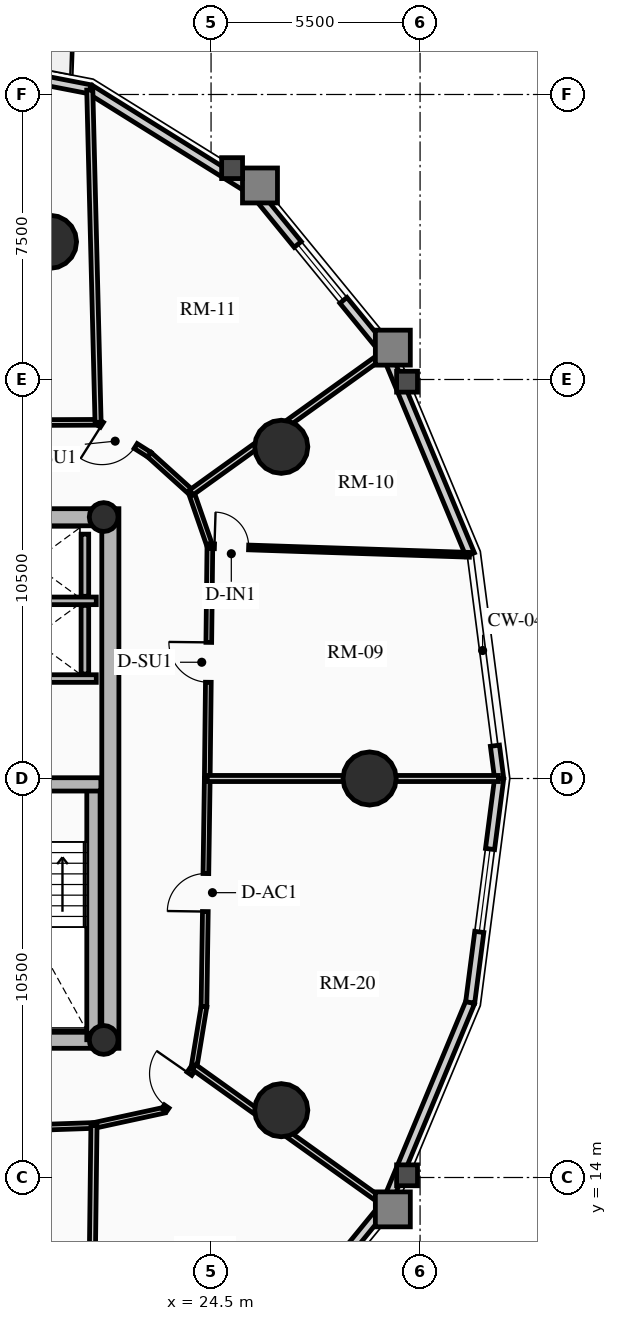
"""IFC4 building model, lengths in metres.
Left out: names, types, materials, properties, quantities, classifications, styles, units other than length and angle.
Written with IfcOpenShell. Run it as: python <this file> out.ifc"""

import sys

from ifc_helpers import new_model, si_unit, direction, frame, frame_2d, origin, origin_2d, place, context, subcontext, project, spatial, rectangle, circle, hollow_circle, extrude, source, transform, mapped, element, fill, save


model = new_model("IFC4")
c1 = context("Model", 3, precision=1e-05, world=origin(), true_north=direction((0.0, 1.0)))
c2 = subcontext(c1, "Body", "Model", "MODEL_VIEW")
j1 = project(units=[si_unit("LENGTHUNIT", "METRE"), si_unit("PLANEANGLEUNIT", "RADIAN")], contexts=[c1])
p1 = place(None, origin())
s1 = spatial("IfcSite", under=j1, at=p1, CompositionType="ELEMENT")
p2 = place(p1, origin())
s2 = spatial("IfcBuilding", under=s1, at=p2, CompositionType="ELEMENT")
p3 = place(p2, frame((0.0, 0.0, 84.7)))
s3 = spatial("IfcBuildingStorey", under=s2, at=p3, CompositionType="ELEMENT", Elevation=84.7)
p4 = place(p3, frame((21.85, 17.4, 0.0), z_axis=(0.0, 0.0, 1.0), x_axis=(0.0, 1.0, 0.0)))
e1 = element("IfcWall", 1, at=p4, inside=s3, PredefinedType="SHEAR", context=c2, shape_type="SweptSolid", body=[
    extrude(rectangle(XDim=14.2, YDim=0.45, at=frame_2d((7.1, 0.0))), origin(), (0.0, 0.0, 1.0), 2.91),
])
p5 = place(p3, frame((11.15, 17.625, 0.0), z_axis=(0.0, 0.0, 1.0), x_axis=(1.0, 0.0, 0.0)))
e2 = element("IfcWall", 2, at=p5, inside=s3, PredefinedType="SHEAR", context=c2, shape_type="SweptSolid", body=[
    extrude(rectangle(XDim=10.7, YDim=0.45, at=frame_2d((5.35, 0.0))), origin(), (0.0, 0.0, 1.0), 2.91),
])
m1 = source(origin(), c2, "Body", "SweptSolid", [
    extrude(rectangle(XDim=1.5, YDim=2.02, at=frame_2d((0.75, 1.01))), frame((0.0, 0.235, 0.0), z_axis=(0.0, -1.0, 0.0), x_axis=(1.0, 0.0, 0.0)), (0.0, 0.0, 1.0), 0.47),
])
p6 = place(p5, frame((5.45, 0.0, 0.0)))
e3 = element("IfcOpeningElement", 3, at=p6, cuts=e2, PredefinedType="OPENING", context=c2, shape_type="MappedRepresentation", body=[
    mapped(m1, transform((0.0, 0.0, 0.0), x_axis=(1.0, 0.0, 0.0), y_axis=(0.0, 1.0, 0.0), z_axis=(0.0, 0.0, 1.0), scale=1.0)),
])
p7 = place(p3, frame((11.15, 31.375, 0.0), z_axis=(0.0, 0.0, 1.0), x_axis=(1.0, 0.0, 0.0)))
e4 = element("IfcWall", 4, at=p7, inside=s3, PredefinedType="SHEAR", context=c2, shape_type="SweptSolid", body=[
    extrude(rectangle(XDim=10.7, YDim=0.45, at=frame_2d((5.35, 0.0))), origin(), (0.0, 0.0, 1.0), 2.91),
])
p8 = place(p7, frame((4.6, 0.0, 0.0)))
e5 = element("IfcOpeningElement", 5, at=p8, cuts=e4, PredefinedType="OPENING", context=c2, shape_type="MappedRepresentation", body=[
    mapped(m1, transform((0.0, 0.0, 0.0), x_axis=(1.0, 0.0, 0.0), y_axis=(0.0, 1.0, 0.0), z_axis=(0.0, 0.0, 1.0), scale=1.0)),
])
p9 = place(p3, frame((21.405, 17.625, 0.0), z_axis=(0.0, 0.0, 1.0), x_axis=(0.0, 1.0, 0.0)))
e6 = element("IfcWall", 6, at=p9, inside=s3, PredefinedType="SHEAR", context=c2, shape_type="SweptSolid", body=[
    extrude(rectangle(XDim=6.72, YDim=0.35, at=frame_2d((3.36, 0.0))), origin(), (0.0, 0.0, 1.0), 2.91),
])
p10 = place(p3, frame((18.315, 24.345, 0.0), z_axis=(0.0, 0.0, 1.0), x_axis=(1.0, 0.0, 0.0)))
e7 = element("IfcWall", 7, at=p10, inside=s3, PredefinedType="SHEAR", context=c2, shape_type="SweptSolid", body=[
    extrude(rectangle(XDim=3.285, YDim=0.35, at=frame_2d((1.643, 0.0))), origin(), (0.0, 0.0, 1.0), 2.91),
])
for number, where, z_axis, x_axis in (
    (8, (21.675, 17.62, 0.0), (0.0, 0.0, 1.0), (1.0, 0.0, 0.0)),
    (9, (21.675, 31.38, 0.0), (0.0, 0.0, 1.0), (1.0, 0.0, 0.0)),
):
    element("IfcColumn", number, at=place(p3, frame(where, z_axis=z_axis, x_axis=x_axis)), inside=s3, PredefinedType="COLUMN", context=c2, shape_type="SweptSolid", body=[
        extrude(hollow_circle(Radius=0.38, WallThickness=0.032, at=origin_2d()), origin(), (0.0, 0.0, 1.0), 2.91),
    ])
for number, where, z_axis, x_axis in (
    (10, (28.672, 24.5, 0.0), (0.0, 0.0, 1.0), (1.0, 0.0, 0.0)),
    (11, (26.347, 33.229, 0.0), (0.0, 0.0, 1.0), (1.0, 0.0, 0.0)),
    (12, (20.261, 38.623, 0.0), (0.0, 0.0, 1.0), (1.0, 0.0, 0.0)),
    (13, (26.347, 15.771, 0.0), (0.0, 0.0, 1.0), (1.0, 0.0, 0.0)),
):
    element("IfcColumn", number, at=place(p3, frame(where, z_axis=z_axis, x_axis=x_axis)), inside=s3, PredefinedType="USERDEFINED", context=c2, shape_type="SweptSolid", body=[
        extrude(circle(Radius=0.7, at=origin_2d()), origin(), (0.0, 0.0, 1.0), 2.91),
    ])
p11 = place(p3, frame((31.969, 25.363, 0.0), z_axis=(0.0, 0.0, 1.0), x_axis=(0.128523364007, -0.991706481225, 0.0)))
e14 = element("IfcWall", 14, at=p11, inside=s3, PredefinedType="SOLIDWALL", context=c2, shape_type="SweptSolid", body=[
    extrude(rectangle(XDim=0.87, YDim=0.24, at=frame_2d((0.435, 0.0))), origin(), (0.0, 0.0, 1.0), 2.655),
])
p12 = place(p3, frame((29.105, 35.709, 0.0), z_axis=(0.0, 0.0, 1.0), x_axis=(0.384344417632, -0.923189779317, 0.0)))
e15 = element("IfcWall", 15, at=p12, inside=s3, PredefinedType="SOLIDWALL", context=c2, shape_type="SweptSolid", body=[
    extrude(rectangle(XDim=5.758, YDim=0.24, at=frame_2d((2.879, 0.0))), origin(), (0.0, 0.0, 1.0), 2.179),
])
p13 = place(p3, frame((25.658, 39.928, 0.0), z_axis=(0.0, 0.0, 1.0), x_axis=(0.632700781152, -0.77439635945, 0.0)))
e16 = element("IfcWall", 16, at=p13, inside=s3, PredefinedType="SOLIDWALL", context=c2, shape_type="SweptSolid", body=[
    extrude(rectangle(XDim=5.448, YDim=0.24, at=frame_2d((2.724, 0.0))), origin(), (0.0, 0.0, 1.0), 2.179),
])
m2 = source(origin(), c2, "Body", "SweptSolid", [
    extrude(rectangle(XDim=1.9, YDim=1.35, at=frame_2d((0.95, 0.675))), frame((0.0, 0.13, 0.0), z_axis=(0.0, -1.0, 0.0), x_axis=(1.0, 0.0, 0.0)), (0.0, 0.0, 1.0), 0.26),
])
p14 = place(p13, frame((1.774, 0.0, 0.65)))
e17 = element("IfcOpeningElement", 17, at=p14, cuts=e16, PredefinedType="OPENING", context=c2, shape_type="MappedRepresentation", body=[
    mapped(m2, transform((0.0, 0.0, 0.0), x_axis=(1.0, 0.0, 0.0), y_axis=(0.0, 1.0, 0.0), z_axis=(0.0, 0.0, 1.0), scale=1.0)),
])
p15 = place(p3, frame((21.315, 42.637, 0.0), z_axis=(0.0, 0.0, 1.0), x_axis=(0.848520380187, -0.529162701263, 0.0)))
e18 = element("IfcWall", 18, at=p15, inside=s3, PredefinedType="SOLIDWALL", context=c2, shape_type="SweptSolid", body=[
    extrude(rectangle(XDim=5.119, YDim=0.24, at=frame_2d((2.56, 0.0))), origin(), (0.0, 0.0, 1.0), 2.179),
])
p16 = place(p3, frame((16.5, 43.57, 0.0), z_axis=(0.0, 0.0, 1.0), x_axis=(0.981723785992, -0.190311344954, 0.0)))
e19 = element("IfcWall", 19, at=p16, inside=s3, PredefinedType="SOLIDWALL", context=c2, shape_type="SweptSolid", body=[
    extrude(rectangle(XDim=4.904, YDim=0.24, at=frame_2d((2.452, 0.0))), origin(), (0.0, 0.0, 1.0), 2.179),
])
m3 = source(origin(), c2, "Body", "SweptSolid", [
    extrude(rectangle(XDim=1.15, YDim=2.005, at=frame_2d((0.575, 1.002))), frame((0.0, 0.13, 0.0), z_axis=(0.0, -1.0, 0.0), x_axis=(1.0, 0.0, 0.0)), (0.0, 0.0, 1.0), 0.26),
])
p17 = place(p16, frame((1.877, 0.0, 0.0)))
e20 = element("IfcOpeningElement", 20, at=p17, cuts=e19, PredefinedType="OPENING", context=c2, shape_type="MappedRepresentation", body=[
    mapped(m3, transform((0.0, 0.0, 0.0), x_axis=(1.0, 0.0, 0.0), y_axis=(0.0, 1.0, 0.0), z_axis=(0.0, 0.0, 1.0), scale=1.0)),
])
p18 = place(p3, frame((29.105, 13.291, 0.0), z_axis=(0.0, 0.0, 1.0), x_axis=(-0.632700781152, -0.77439635945, 0.0)))
e21 = element("IfcWall", 21, at=p18, inside=s3, PredefinedType="SOLIDWALL", context=c2, shape_type="SweptSolid", body=[
    extrude(rectangle(XDim=5.448, YDim=0.24, at=frame_2d((2.724, 0.0))), origin(), (0.0, 0.0, 1.0), 2.179),
])
p19 = place(p18, frame((1.774, 0.0, 0.65)))
e22 = element("IfcOpeningElement", 22, at=p19, cuts=e21, PredefinedType="OPENING", context=c2, shape_type="MappedRepresentation", body=[
    mapped(m2, transform((0.0, 0.0, 0.0), x_axis=(1.0, 0.0, 0.0), y_axis=(0.0, 1.0, 0.0), z_axis=(0.0, 0.0, 1.0), scale=1.0)),
])
p20 = place(p3, frame((31.318, 18.607, 0.0), z_axis=(0.0, 0.0, 1.0), x_axis=(-0.384344417632, -0.923189779317, 0.0)))
e23 = element("IfcWall", 23, at=p20, inside=s3, PredefinedType="SOLIDWALL", context=c2, shape_type="SweptSolid", body=[
    extrude(rectangle(XDim=5.758, YDim=0.24, at=frame_2d((2.879, 0.0))), origin(), (0.0, 0.0, 1.0), 2.179),
])
p21 = place(p3, frame((32.081, 24.5, 0.0), z_axis=(0.0, 0.0, 1.0), x_axis=(-0.128351991996, -0.991728675672, 0.0)))
e24 = element("IfcWall", 24, at=p21, inside=s3, PredefinedType="SOLIDWALL", context=c2, shape_type="SweptSolid", body=[
    extrude(rectangle(XDim=5.942, YDim=0.24, at=frame_2d((2.971, 0.0))), origin(), (0.0, 0.0, 1.0), 2.179),
])
m4 = source(origin(), c2, "Body", "SweptSolid", [
    extrude(rectangle(XDim=2.2, YDim=1.35, at=frame_2d((1.1, 0.675))), frame((0.0, 0.13, 0.0), z_axis=(0.0, -1.0, 0.0), x_axis=(1.0, 0.0, 0.0)), (0.0, 0.0, 1.0), 0.26),
])
p22 = place(p21, frame((1.871, 0.0, 0.65)))
e25 = element("IfcOpeningElement", 25, at=p22, cuts=e24, PredefinedType="OPENING", context=c2, shape_type="MappedRepresentation", body=[
    mapped(m4, transform((0.0, 0.0, 0.0), x_axis=(1.0, 0.0, 0.0), y_axis=(0.0, 1.0, 0.0), z_axis=(0.0, 0.0, 1.0), scale=1.0)),
])
for number, where, z_axis, x_axis in (
    (26, (18.51, 27.13, 0.0), (0.0, 0.0, 1.0), (1.0, 0.0, 0.0)),
    (27, (18.51, 29.175, 0.0), (0.0, 0.0, 1.0), (1.0, 0.0, 0.0)),
):
    element("IfcWall", number, at=place(p3, frame(where, z_axis=z_axis, x_axis=x_axis)), inside=s3, PredefinedType="SHEAR", context=c2, shape_type="SweptSolid", body=[
        extrude(rectangle(XDim=2.97, YDim=0.2, at=frame_2d((1.485, 0.0))), origin(), (0.0, 0.0, 1.0), 2.91),
    ])
p23 = place(p3, frame((21.18, 27.25, 0.0), z_axis=(0.0, 0.0, 1.0), x_axis=(0.0, 1.0, 0.0)))
e28 = element("IfcWall", 28, at=p23, inside=s3, PredefinedType="SHEAR", context=c2, shape_type="SweptSolid", body=[
    extrude(rectangle(XDim=1.805, YDim=0.2, at=frame_2d((0.902, 0.0))), origin(), (0.0, 0.0, 1.0), 2.91),
])
p24 = place(p3, frame((21.18, 29.295, 0.0), z_axis=(0.0, 0.0, 1.0), x_axis=(0.0, 1.0, 0.0)))
e29 = element("IfcWall", 29, at=p24, inside=s3, PredefinedType="SHEAR", context=c2, shape_type="SweptSolid", body=[
    extrude(rectangle(XDim=1.635, YDim=0.2, at=frame_2d((0.817, 0.0))), origin(), (0.0, 0.0, 1.0), 2.91),
])
p25 = place(p3, frame((24.4, 24.5, 0.0), z_axis=(0.0, 0.0, 1.0), x_axis=(0.011299841544, 0.999936154752, 0.0)))
e30 = element("IfcWall", 30, at=p25, inside=s3, PredefinedType="PARTITIONING", context=c2, shape_type="SweptSolid", body=[
    extrude(rectangle(XDim=6.115, YDim=0.15, at=frame_2d((3.057, 0.0))), origin(), (0.0, 0.0, 1.0), 2.225),
])
m5 = source(origin(), c2, "Body", "SweptSolid", [
    extrude(rectangle(XDim=1.05, YDim=2.015, at=frame_2d((0.525, 1.007))), frame((0.0, 0.085, 0.0), z_axis=(0.0, -1.0, 0.0), x_axis=(1.0, 0.0, 0.0)), (0.0, 0.0, 1.0), 0.17),
])
p26 = place(p25, frame((2.532, 0.0, 0.0)))
e31 = element("IfcOpeningElement", 31, at=p26, cuts=e30, PredefinedType="OPENING", context=c2, shape_type="MappedRepresentation", body=[
    mapped(m5, transform((0.0, 0.0, 0.0), x_axis=(1.0, 0.0, 0.0), y_axis=(0.0, 1.0, 0.0), z_axis=(0.0, 0.0, 1.0), scale=1.0)),
])
p27 = place(p3, frame((24.469, 30.614, 0.0), z_axis=(0.0, 0.0, 1.0), x_axis=(-0.327228335485, 0.944945298129, 0.0)))
e32 = element("IfcWall", 32, at=p27, inside=s3, PredefinedType="PARTITIONING", context=c2, shape_type="SweptSolid", body=[
    extrude(rectangle(XDim=1.495, YDim=0.15, at=frame_2d((0.748, 0.0))), origin(), (0.0, 0.0, 1.0), 2.225),
])
p28 = place(p3, frame((23.98, 32.027, 0.0), z_axis=(0.0, 0.0, 1.0), x_axis=(-0.742353224332, 0.670008724065, 0.0)))
e33 = element("IfcWall", 33, at=p28, inside=s3, PredefinedType="PARTITIONING", context=c2, shape_type="SweptSolid", body=[
    extrude(rectangle(XDim=1.485, YDim=0.15, at=frame_2d((0.742, 0.0))), origin(), (0.0, 0.0, 1.0), 2.225),
])
p29 = place(p3, frame((22.877, 33.022, 0.0), z_axis=(0.0, 0.0, 1.0), x_axis=(-0.845895608855, 0.533348496689, 0.0)))
e34 = element("IfcWall", 34, at=p29, inside=s3, PredefinedType="PARTITIONING", context=c2, shape_type="SweptSolid", body=[
    extrude(rectangle(XDim=1.597, YDim=0.15, at=frame_2d((0.798, 0.0))), origin(), (0.0, 0.0, 1.0), 2.225),
])
p30 = place(p29, frame((0.427, 0.0, 0.0)))
e35 = element("IfcOpeningElement", 35, at=p30, cuts=e34, PredefinedType="OPENING", context=c2, shape_type="MappedRepresentation", body=[
    mapped(m5, transform((0.0, 0.0, 0.0), x_axis=(1.0, 0.0, 0.0), y_axis=(0.0, 1.0, 0.0), z_axis=(0.0, 0.0, 1.0), scale=1.0)),
])
p31 = place(p3, frame((21.527, 33.873, 0.0), z_axis=(0.0, 0.0, 1.0), x_axis=(-0.999991838845, -0.004040079574, 0.0)))
e36 = element("IfcWall", 36, at=p31, inside=s3, PredefinedType="PARTITIONING", context=c2, shape_type="SweptSolid", body=[
    extrude(rectangle(XDim=3.384, YDim=0.15, at=frame_2d((1.692, 0.0))), origin(), (0.0, 0.0, 1.0), 2.225),
])
p32 = place(p3, frame((14.781, 15.141, 0.0), z_axis=(0.0, 0.0, 1.0), x_axis=(0.999407918707, 0.034406569513, 0.0)))
e37 = element("IfcWall", 37, at=p32, inside=s3, PredefinedType="PARTITIONING", context=c2, shape_type="SweptSolid", body=[
    extrude(rectangle(XDim=6.642, YDim=0.15, at=frame_2d((3.321, 0.0))), origin(), (0.0, 0.0, 1.0), 2.225),
])
p33 = place(p32, frame((2.796, 0.0, 0.0)))
e38 = element("IfcOpeningElement", 38, at=p33, cuts=e37, PredefinedType="OPENING", context=c2, shape_type="MappedRepresentation", body=[
    mapped(m5, transform((0.0, 0.0, 0.0), x_axis=(1.0, 0.0, 0.0), y_axis=(0.0, 1.0, 0.0), z_axis=(0.0, 0.0, 1.0), scale=1.0)),
])
p34 = place(p3, frame((21.419, 15.369, 0.0), z_axis=(0.0, 0.0, 1.0), x_axis=(0.977192701953, 0.212354475464, 0.0)))
e39 = element("IfcWall", 39, at=p34, inside=s3, PredefinedType="PARTITIONING", context=c2, shape_type="SweptSolid", body=[
    extrude(rectangle(XDim=1.888, YDim=0.15, at=frame_2d((0.944, 0.0))), origin(), (0.0, 0.0, 1.0), 2.225),
])
p35 = place(p3, frame((23.263, 15.77, 0.0), z_axis=(0.0, 0.0, 1.0), x_axis=(0.570743456919, 0.821128434768, 0.0)))
e40 = element("IfcWall", 40, at=p35, inside=s3, PredefinedType="PARTITIONING", context=c2, shape_type="SweptSolid", body=[
    extrude(rectangle(XDim=1.382, YDim=0.15, at=frame_2d((0.691, 0.0))), origin(), (0.0, 0.0, 1.0), 2.225),
])
p36 = place(p35, frame((0.12, 0.0, 0.0)))
e41 = element("IfcOpeningElement", 41, at=p36, cuts=e40, PredefinedType="OPENING", context=c2, shape_type="MappedRepresentation", body=[
    mapped(m5, transform((0.0, 0.0, 0.0), x_axis=(1.0, 0.0, 0.0), y_axis=(0.0, 1.0, 0.0), z_axis=(0.0, 0.0, 1.0), scale=1.0)),
])
p37 = place(p3, frame((24.052, 16.905, 0.0), z_axis=(0.0, 0.0, 1.0), x_axis=(0.162091534225, 0.986775726562, 0.0)))
e42 = element("IfcWall", 42, at=p37, inside=s3, PredefinedType="PARTITIONING", context=c2, shape_type="SweptSolid", body=[
    extrude(rectangle(XDim=1.613, YDim=0.15, at=frame_2d((0.807, 0.0))), origin(), (0.0, 0.0, 1.0), 2.225),
])
p38 = place(p3, frame((24.313, 18.496, 0.0), z_axis=(0.0, 0.0, 1.0), x_axis=(0.014394019188, 0.999896400739, 0.0)))
e43 = element("IfcWall", 43, at=p38, inside=s3, PredefinedType="PARTITIONING", context=c2, shape_type="SweptSolid", body=[
    extrude(rectangle(XDim=6.004, YDim=0.15, at=frame_2d((3.002, 0.0))), origin(), (0.0, 0.0, 1.0), 2.655),
])
m6 = source(origin(), c2, "Body", "SweptSolid", [
    extrude(rectangle(XDim=1.0, YDim=2.015, at=frame_2d((0.5, 1.007))), frame((0.0, 0.085, 0.0), z_axis=(0.0, -1.0, 0.0), x_axis=(1.0, 0.0, 0.0)), (0.0, 0.0, 1.0), 0.17),
])
p39 = place(p38, frame((2.502, 0.0, 0.0)))
e44 = element("IfcOpeningElement", 44, at=p39, cuts=e43, PredefinedType="OPENING", context=c2, shape_type="MappedRepresentation", body=[
    mapped(m6, transform((0.0, 0.0, 0.0), x_axis=(1.0, 0.0, 0.0), y_axis=(0.0, 1.0, 0.0), z_axis=(0.0, 0.0, 1.0), scale=1.0)),
])
p40 = place(p3, frame((24.4, 24.5, 0.0), z_axis=(0.0, 0.0, 1.0), x_axis=(1.0, 0.0, 0.0)))
e45 = element("IfcWall", 45, at=p40, inside=s3, PredefinedType="PARTITIONING", context=c2, shape_type="SweptSolid", body=[
    extrude(rectangle(XDim=7.661, YDim=0.16, at=frame_2d((3.831, 0.0))), origin(), (0.0, 0.0, 1.0), 2.179),
])
p41 = place(p3, frame((23.98, 32.027, 0.0), z_axis=(0.0, 0.0, 1.0), x_axis=(0.812162479031, 0.58343132214, 0.0)))
e46 = element("IfcWall", 46, at=p41, inside=s3, PredefinedType="PARTITIONING", context=c2, shape_type="SweptSolid", body=[
    extrude(rectangle(XDim=6.291, YDim=0.16, at=frame_2d((3.146, 0.0))), origin(), (0.0, 0.0, 1.0), 2.179),
])
p42 = place(p3, frame((21.527, 33.873, 0.0), z_axis=(0.0, 0.0, 1.0), x_axis=(-0.024952442794, 0.999688639327, 0.0)))
e47 = element("IfcWall", 47, at=p42, inside=s3, PredefinedType="PARTITIONING", context=c2, shape_type="SweptSolid", body=[
    extrude(rectangle(XDim=8.747, YDim=0.16, at=frame_2d((4.374, 0.0))), origin(), (0.0, 0.0, 1.0), 2.179),
])
p43 = place(p3, frame((21.419, 15.369, 0.0), z_axis=(0.0, 0.0, 1.0), x_axis=(-0.012251185903, -0.999924951406, 0.0)))
e48 = element("IfcWall", 48, at=p43, inside=s3, PredefinedType="PARTITIONING", context=c2, shape_type="SweptSolid", body=[
    extrude(rectangle(XDim=8.988, YDim=0.16, at=frame_2d((4.494, 0.0))), origin(), (0.0, 0.0, 1.0), 2.179),
])
p44 = place(p3, frame((24.052, 16.905, 0.0), z_axis=(0.0, 0.0, 1.0), x_axis=(0.813437670746, -0.581652091727, 0.0)))
e49 = element("IfcWall", 49, at=p44, inside=s3, PredefinedType="PARTITIONING", context=c2, shape_type="SweptSolid", body=[
    extrude(rectangle(XDim=6.192, YDim=0.16, at=frame_2d((3.096, 0.0))), origin(), (0.0, 0.0, 1.0), 2.179),
])
p45 = place(p3, frame((24.469, 30.614, 0.0), z_axis=(0.0, 0.0, 1.0), x_axis=(0.999446768925, -0.033258924898, 0.0)))
e50 = element("IfcWall", 50, at=p45, inside=s3, PredefinedType="PARTITIONING", context=c2, shape_type="SweptSolid", body=[
    extrude(rectangle(XDim=6.834, YDim=0.125, at=frame_2d((3.417, 0.0))), origin(), (0.0, 0.0, 1.0), 2.179),
])
m7 = source(origin(), c2, "Body", "SweptSolid", [
    extrude(rectangle(XDim=0.9, YDim=2.005, at=frame_2d((0.45, 1.002))), frame((0.0, 0.073, 0.0), z_axis=(0.0, -1.0, 0.0), x_axis=(1.0, 0.0, 0.0)), (0.0, 0.0, 1.0), 0.145),
])
p46 = place(p45, frame((0.12, 0.0, 0.0)))
e51 = element("IfcOpeningElement", 51, at=p46, cuts=e50, PredefinedType="OPENING", context=c2, shape_type="MappedRepresentation", body=[
    mapped(m7, transform((0.0, 0.0, 0.0), x_axis=(1.0, 0.0, 0.0), y_axis=(0.0, 1.0, 0.0), z_axis=(0.0, 0.0, 1.0), scale=1.0)),
])
m8 = source(origin(), c2, "Body", "SweptSolid", [
    extrude(rectangle(XDim=1.9, YDim=1.35, at=frame_2d((0.95, 0.675))), frame((0.0, 0.03, 0.0), z_axis=(0.0, -1.0, 0.0), x_axis=(1.0, 0.0, 0.0)), (0.0, 0.0, 1.0), 0.06),
])
p47 = place(p14, origin())
e52 = element("IfcWindow", 52, at=p47, inside=s3, PartitioningType="DOUBLE_PANEL_VERTICAL", PredefinedType="WINDOW", context=c2, shape_type="MappedRepresentation", body=[
    mapped(m8, transform((0.0, 0.0, 0.0), x_axis=(1.0, 0.0, 0.0), y_axis=(0.0, 1.0, 0.0), z_axis=(0.0, 0.0, 1.0), scale=1.0)),
])
fill(e17, e52)
m9 = source(origin(), c2, "Body", "SweptSolid", [
    extrude(rectangle(XDim=2.2, YDim=1.35, at=frame_2d((1.1, 0.675))), frame((0.0, 0.03, 0.0), z_axis=(0.0, -1.0, 0.0), x_axis=(1.0, 0.0, 0.0)), (0.0, 0.0, 1.0), 0.06),
])
p48 = place(p22, origin())
e53 = element("IfcWindow", 53, at=p48, inside=s3, PartitioningType="DOUBLE_PANEL_VERTICAL", PredefinedType="WINDOW", context=c2, shape_type="MappedRepresentation", body=[
    mapped(m9, transform((0.0, 0.0, 0.0), x_axis=(1.0, 0.0, 0.0), y_axis=(0.0, 1.0, 0.0), z_axis=(0.0, 0.0, 1.0), scale=1.0)),
])
fill(e25, e53)
m10 = source(origin(), c2, "Body", "SweptSolid", [
    extrude(rectangle(XDim=1.05, YDim=2.015, at=frame_2d((0.525, 1.007))), frame((0.0, 0.025, 0.0), z_axis=(0.0, -1.0, 0.0), x_axis=(1.0, 0.0, 0.0)), (0.0, 0.0, 1.0), 0.05),
])
p49 = place(p26, origin())
e54 = element("IfcDoor", 54, at=p49, inside=s3, OperationType="SINGLE_SWING_RIGHT", PredefinedType="DOOR", context=c2, shape_type="MappedRepresentation", body=[
    mapped(m10, transform((0.0, 0.0, 0.0), x_axis=(1.0, 0.0, 0.0), y_axis=(0.0, 1.0, 0.0), z_axis=(0.0, 0.0, 1.0), scale=1.0)),
])
fill(e31, e54)
m11 = source(origin(), c2, "Body", "SweptSolid", [
    extrude(rectangle(XDim=0.9, YDim=2.005, at=frame_2d((0.45, 1.002))), frame((0.0, 0.025, 0.0), z_axis=(0.0, -1.0, 0.0), x_axis=(1.0, 0.0, 0.0)), (0.0, 0.0, 1.0), 0.05),
])
p50 = place(p46, origin())
e55 = element("IfcDoor", 55, at=p50, inside=s3, OperationType="SINGLE_SWING_LEFT", PredefinedType="DOOR", context=c2, shape_type="MappedRepresentation", body=[
    mapped(m11, transform((0.0, 0.0, 0.0), x_axis=(1.0, 0.0, 0.0), y_axis=(0.0, 1.0, 0.0), z_axis=(0.0, 0.0, 1.0), scale=1.0)),
])
fill(e51, e55)
p51 = place(p30, origin())
e56 = element("IfcDoor", 56, at=p51, inside=s3, OperationType="SINGLE_SWING_RIGHT", PredefinedType="DOOR", context=c2, shape_type="MappedRepresentation", body=[
    mapped(m10, transform((0.0, 0.0, 0.0), x_axis=(1.0, 0.0, 0.0), y_axis=(0.0, 1.0, 0.0), z_axis=(0.0, 0.0, 1.0), scale=1.0)),
])
fill(e35, e56)
p52 = place(p36, origin())
e57 = element("IfcDoor", 57, at=p52, inside=s3, OperationType="SINGLE_SWING_RIGHT", PredefinedType="DOOR", context=c2, shape_type="MappedRepresentation", body=[
    mapped(m10, transform((0.0, 0.0, 0.0), x_axis=(1.0, 0.0, 0.0), y_axis=(0.0, 1.0, 0.0), z_axis=(0.0, 0.0, 1.0), scale=1.0)),
])
fill(e41, e57)
m12 = source(origin(), c2, "Body", "SweptSolid", [
    extrude(rectangle(XDim=1.0, YDim=2.015, at=frame_2d((0.5, 1.007))), frame((0.0, 0.025, 0.0), z_axis=(0.0, -1.0, 0.0), x_axis=(1.0, 0.0, 0.0)), (0.0, 0.0, 1.0), 0.05),
])
p53 = place(p39, origin())
e58 = element("IfcDoor", 58, at=p53, inside=s3, OperationType="SINGLE_SWING_LEFT", PredefinedType="DOOR", context=c2, shape_type="MappedRepresentation", body=[
    mapped(m12, transform((0.0, 0.0, 0.0), x_axis=(1.0, 0.0, 0.0), y_axis=(0.0, 1.0, 0.0), z_axis=(0.0, 0.0, 1.0), scale=1.0)),
])
fill(e44, e58)
save(model, sys.argv[1])
